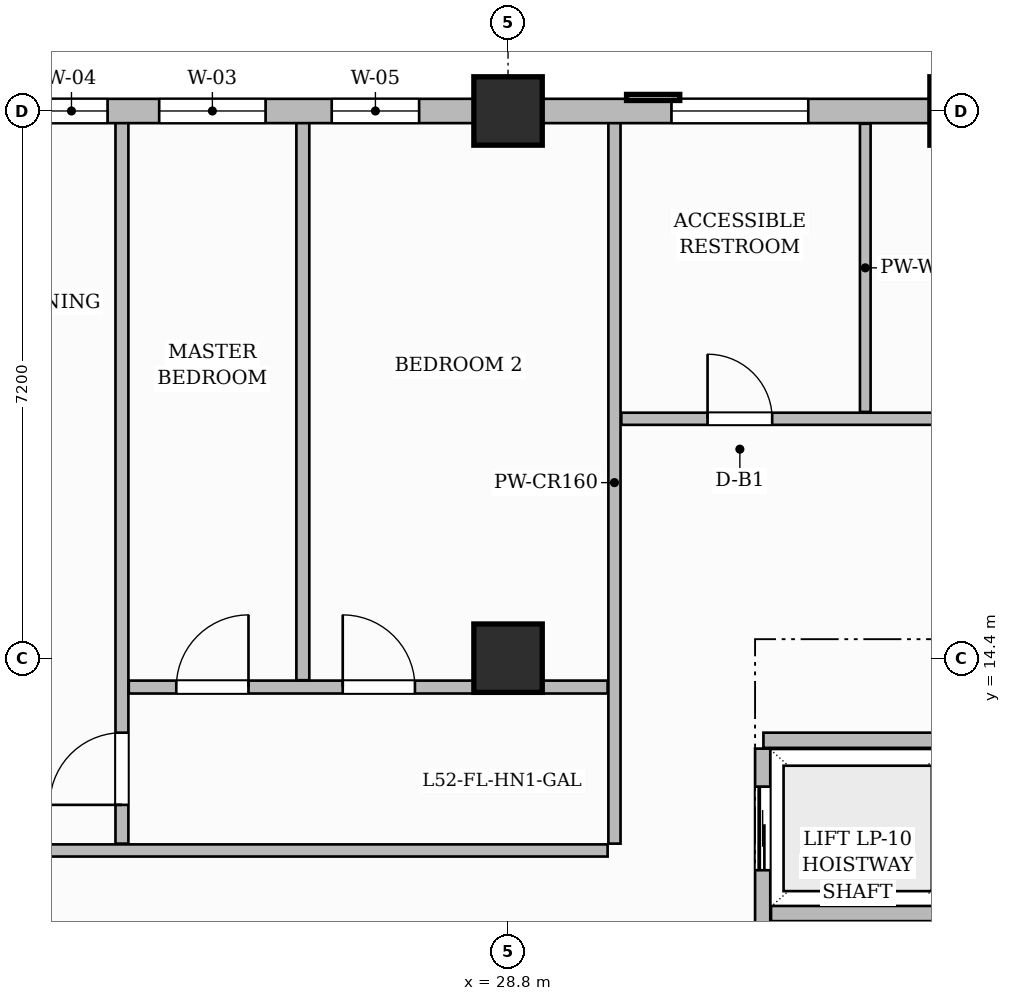
"""IFC4 building model, lengths in metres.
Left out: names, types, materials, properties, quantities, classifications, styles, units other than length and angle.
Written with IfcOpenShell. Run it as: python <this file> out.ifc"""

import sys

from ifc_helpers import new_model, si_unit, direction, frame, frame_2d, origin, origin_2d, place, context, subcontext, project, spatial, rectangle, extrude, source, transform, mapped, element, fill, save


model = new_model("IFC4")
c1 = context("Model", 3, precision=1e-05, world=origin(), true_north=direction((0.0, 1.0)))
c2 = subcontext(c1, "Body", "Model", "MODEL_VIEW")
j1 = project(units=[si_unit("LENGTHUNIT", "METRE"), si_unit("PLANEANGLEUNIT", "RADIAN")], contexts=[c1])
p1 = place(None, origin())
s1 = spatial("IfcSite", under=j1, at=p1, CompositionType="ELEMENT")
p2 = place(p1, origin())
s2 = spatial("IfcBuilding", under=s1, at=p2, CompositionType="ELEMENT")
p3 = place(p2, frame((0.0, 0.0, 209.6)))
s3 = spatial("IfcBuildingStorey", under=s2, at=p3, CompositionType="ELEMENT", Elevation=209.6)
m1 = source(origin(), c2, "Body", "SweptSolid", [
    extrude(rectangle(XDim=0.9, YDim=0.9, at=origin_2d()), origin(), (0.0, 0.0, 1.0), 3.85),
])
for number, where, z_axis, x_axis in (
    (1, (28.8, 14.4, 0.0), (0.0, 0.0, 1.0), (1.0, 0.0, 0.0)),
    (2, (28.8, 21.6, 0.0), (0.0, 0.0, 1.0), (1.0, 0.0, 0.0)),
    (3, (34.8, 21.6, 0.0), (0.0, 0.0, 1.0), (1.0, 0.0, 0.0)),
):
    element("IfcColumn", number, at=place(p3, frame(where, z_axis=z_axis, x_axis=x_axis)), inside=s3, PredefinedType="COLUMN", context=c2, shape_type="MappedRepresentation", body=[
        mapped(m1, transform((0.0, 0.0, 0.0), scale=1.0)),
    ])
p4 = place(p3, frame((32.16, 13.32, 0.0), z_axis=(0.0, 0.0, 1.0), x_axis=(1.0, 0.0, 0.0)))
e4 = element("IfcWall", 4, at=p4, inside=s3, PredefinedType="PARTITIONING", context=c2, shape_type="SweptSolid", body=[
    extrude(rectangle(XDim=2.36, YDim=0.2, at=frame_2d((1.18, 0.0))), origin(), (0.0, 0.0, 1.0), 3.6),
])
p5 = place(p3, frame((32.15, 4.39, 0.0), z_axis=(0.0, 0.0, 1.0), x_axis=(0.0, 1.0, 0.0)))
e5 = element("IfcWall", 5, at=p5, inside=s3, PredefinedType="PARTITIONING", context=c2, shape_type="SweptSolid", body=[
    extrude(rectangle(XDim=8.82, YDim=0.2, at=frame_2d((4.41, 0.0))), origin(), (0.0, 0.0, 1.0), 3.6),
])
p6 = place(p5, frame((0.5, 0.0, 0.0)))
e6 = element("IfcOpeningElement", 6, at=p6, cuts=e5, PredefinedType="OPENING", context=c2, shape_type="SweptSolid", body=[
    extrude(rectangle(XDim=1.1, YDim=2.2, at=frame_2d((0.55, 1.1))), frame((0.0, 0.11, 0.0), z_axis=(0.0, -1.0, 0.0), x_axis=(1.0, 0.0, 0.0)), (0.0, 0.0, 1.0), 0.22),
])
p7 = place(p5, frame((2.74, 0.0, 0.0)))
e7 = element("IfcOpeningElement", 7, at=p7, cuts=e5, PredefinedType="OPENING", context=c2, shape_type="SweptSolid", body=[
    extrude(rectangle(XDim=1.1, YDim=2.2, at=frame_2d((0.55, 1.1))), frame((0.0, 0.11, 0.0), z_axis=(0.0, -1.0, 0.0), x_axis=(1.0, 0.0, 0.0)), (0.0, 0.0, 1.0), 0.22),
])
p8 = place(p5, frame((4.98, 0.0, 0.0)))
e8 = element("IfcOpeningElement", 8, at=p8, cuts=e5, PredefinedType="OPENING", context=c2, shape_type="SweptSolid", body=[
    extrude(rectangle(XDim=1.1, YDim=2.2, at=frame_2d((0.55, 1.1))), frame((0.0, 0.11, 0.0), z_axis=(0.0, -1.0, 0.0), x_axis=(1.0, 0.0, 0.0)), (0.0, 0.0, 1.0), 0.22),
])
p9 = place(p5, frame((7.22, 0.0, 0.0)))
e9 = element("IfcOpeningElement", 9, at=p9, cuts=e5, PredefinedType="OPENING", context=c2, shape_type="SweptSolid", body=[
    extrude(rectangle(XDim=1.1, YDim=2.2, at=frame_2d((0.55, 1.1))), frame((0.0, 0.11, 0.0), z_axis=(0.0, -1.0, 0.0), x_axis=(1.0, 0.0, 0.0)), (0.0, 0.0, 1.0), 0.22),
])
p10 = place(p3, frame((32.26, 11.04, 0.0), z_axis=(0.0, 0.0, 1.0), x_axis=(1.0, 0.0, 0.0)))
e10 = element("IfcWall", 10, at=p10, inside=s3, PredefinedType="PARTITIONING", context=c2, shape_type="SweptSolid", body=[
    extrude(rectangle(XDim=2.23, YDim=0.2, at=frame_2d((1.115, 0.0))), origin(), (0.0, 0.0, 1.0), 3.6),
])
p11 = place(p3, frame((14.568, 11.87, 0.0), z_axis=(0.0, 0.0, 1.0), x_axis=(1.0, 0.0, 0.0)))
e11 = element("IfcWall", 11, at=p11, inside=s3, PredefinedType="PARTITIONING", context=c2, shape_type="SweptSolid", body=[
    extrude(rectangle(XDim=15.542, YDim=0.16, at=frame_2d((7.771, 0.0))), origin(), (0.0, 0.0, 1.0), 3.6),
])
p12 = place(p11, frame((6.557, 0.0, 0.0)))
e12 = element("IfcOpeningElement", 12, at=p12, cuts=e11, PredefinedType="OPENING", context=c2, shape_type="SweptSolid", body=[
    extrude(rectangle(XDim=1.05, YDim=2.25, at=frame_2d((0.525, 1.125))), frame((0.0, 0.09, 0.0), z_axis=(0.0, -1.0, 0.0), x_axis=(1.0, 0.0, 0.0)), (0.0, 0.0, 1.0), 0.18),
])
p13 = place(p3, frame((30.2, 11.96, 0.0), z_axis=(0.0, 0.0, 1.0), x_axis=(0.0, 1.0, 0.0)))
e13 = element("IfcWall", 13, at=p13, inside=s3, PredefinedType="PARTITIONING", context=c2, shape_type="SweptSolid", body=[
    extrude(rectangle(XDim=9.5, YDim=0.16, at=frame_2d((4.75, 0.0))), origin(), (0.0, 0.0, 1.0), 3.6),
])
p14 = place(p3, frame((30.29, 17.55, 0.0), z_axis=(0.0, 0.0, 1.0), x_axis=(1.0, 0.0, 0.0)))
e14 = element("IfcWall", 14, at=p14, inside=s3, PredefinedType="PARTITIONING", context=c2, shape_type="SweptSolid", body=[
    extrude(rectangle(XDim=19.37, YDim=0.16, at=frame_2d((9.685, 0.0))), origin(), (0.0, 0.0, 1.0), 3.6),
])
p15 = place(p14, frame((1.135, 0.0, 0.0)))
e15 = element("IfcOpeningElement", 15, at=p15, cuts=e14, PredefinedType="OPENING", context=c2, shape_type="SweptSolid", body=[
    extrude(rectangle(XDim=0.85, YDim=2.1, at=frame_2d((0.425, 1.05))), frame((0.0, 0.09, 0.0), z_axis=(0.0, -1.0, 0.0), x_axis=(1.0, 0.0, 0.0)), (0.0, 0.0, 1.0), 0.18),
])
p16 = place(p14, frame((5.71, 0.0, 0.0)))
e16 = element("IfcOpeningElement", 16, at=p16, cuts=e14, PredefinedType="OPENING", context=c2, shape_type="SweptSolid", body=[
    extrude(rectangle(XDim=0.9, YDim=2.15, at=frame_2d((0.45, 1.075))), frame((0.0, 0.09, 0.0), z_axis=(0.0, -1.0, 0.0), x_axis=(1.0, 0.0, 0.0)), (0.0, 0.0, 1.0), 0.18),
])
p17 = place(p14, frame((10.635, 0.0, 0.0)))
e17 = element("IfcOpeningElement", 17, at=p17, cuts=e14, PredefinedType="OPENING", context=c2, shape_type="SweptSolid", body=[
    extrude(rectangle(XDim=0.95, YDim=2.15, at=frame_2d((0.475, 1.075))), frame((0.0, 0.09, 0.0), z_axis=(0.0, -1.0, 0.0), x_axis=(1.0, 0.0, 0.0)), (0.0, 0.0, 1.0), 0.18),
])
p18 = place(p14, frame((16.235, 0.0, 0.0)))
e18 = element("IfcOpeningElement", 18, at=p18, cuts=e14, PredefinedType="OPENING", context=c2, shape_type="SweptSolid", body=[
    extrude(rectangle(XDim=0.95, YDim=2.15, at=frame_2d((0.475, 1.075))), frame((0.0, 0.09, 0.0), z_axis=(0.0, -1.0, 0.0), x_axis=(1.0, 0.0, 0.0)), (0.0, 0.0, 1.0), 0.18),
])
p19 = place(p3, frame((33.5, 17.64, 0.0), z_axis=(0.0, 0.0, 1.0), x_axis=(0.0, 1.0, 0.0)))
e19 = element("IfcWall", 19, at=p19, inside=s3, PredefinedType="PARTITIONING", context=c2, shape_type="SweptSolid", body=[
    extrude(rectangle(XDim=3.792, YDim=0.14, at=frame_2d((1.896, 0.0))), origin(), (0.0, 0.0, 1.0), 3.6),
])
p20 = place(p3, frame((23.72, 11.96, 0.0), z_axis=(0.0, 0.0, 1.0), x_axis=(0.0, 1.0, 0.0)))
e20 = element("IfcWall", 20, at=p20, inside=s3, PredefinedType="PARTITIONING", context=c2, shape_type="SweptSolid", body=[
    extrude(rectangle(XDim=9.5, YDim=0.17, at=frame_2d((4.75, 0.0))), origin(), (0.0, 0.0, 1.0), 3.6),
])
p21 = place(p20, frame((0.51, 0.0, 0.0)))
e21 = element("IfcOpeningElement", 21, at=p21, cuts=e20, PredefinedType="OPENING", context=c2, shape_type="SweptSolid", body=[
    extrude(rectangle(XDim=0.95, YDim=2.15, at=frame_2d((0.475, 1.075))), frame((0.0, 0.095, 0.0), z_axis=(0.0, -1.0, 0.0), x_axis=(1.0, 0.0, 0.0)), (0.0, 0.0, 1.0), 0.19),
])
p22 = place(p3, frame((23.81, 14.02, 0.0), z_axis=(0.0, 0.0, 1.0), x_axis=(1.0, 0.0, 0.0)))
e22 = element("IfcWall", 22, at=p22, inside=s3, PredefinedType="PARTITIONING", context=c2, shape_type="SweptSolid", body=[
    extrude(rectangle(XDim=6.3, YDim=0.17, at=frame_2d((3.15, 0.0))), origin(), (0.0, 0.0, 1.0), 3.6),
])
p23 = place(p22, frame((0.625, 0.0, 0.0)))
e23 = element("IfcOpeningElement", 23, at=p23, cuts=e22, PredefinedType="OPENING", context=c2, shape_type="SweptSolid", body=[
    extrude(rectangle(XDim=0.95, YDim=2.15, at=frame_2d((0.475, 1.075))), frame((0.0, 0.095, 0.0), z_axis=(0.0, -1.0, 0.0), x_axis=(1.0, 0.0, 0.0)), (0.0, 0.0, 1.0), 0.19),
])
p24 = place(p22, frame((2.815, 0.0, 0.0)))
e24 = element("IfcOpeningElement", 24, at=p24, cuts=e22, PredefinedType="OPENING", context=c2, shape_type="SweptSolid", body=[
    extrude(rectangle(XDim=0.95, YDim=2.15, at=frame_2d((0.475, 1.075))), frame((0.0, 0.095, 0.0), z_axis=(0.0, -1.0, 0.0), x_axis=(1.0, 0.0, 0.0)), (0.0, 0.0, 1.0), 0.19),
])
p25 = place(p3, frame((26.1, 14.11, 0.0), z_axis=(0.0, 0.0, 1.0), x_axis=(0.0, 1.0, 0.0)))
e25 = element("IfcWall", 25, at=p25, inside=s3, PredefinedType="PARTITIONING", context=c2, shape_type="SweptSolid", body=[
    extrude(rectangle(XDim=7.35, YDim=0.17, at=frame_2d((3.675, 0.0))), origin(), (0.0, 0.0, 1.0), 3.6),
])
p26 = place(p3, frame((18.0, 21.6, 0.0), z_axis=(0.0, 0.0, 1.0), x_axis=(1.0, 0.0, 0.0)))
e26 = element("IfcWall", 26, at=p26, inside=s3, PredefinedType="SOLIDWALL", context=c2, shape_type="SweptSolid", body=[
    extrude(rectangle(XDim=31.8, YDim=0.32, at=frame_2d((15.9, 0.0))), origin(), (0.0, 0.0, 1.0), 3.085),
])
p27 = place(p26, frame((0.885, 0.0, 0.8)))
e27 = element("IfcOpeningElement", 27, at=p27, cuts=e26, PredefinedType="OPENING", context=c2, shape_type="SweptSolid", body=[
    extrude(rectangle(XDim=1.4, YDim=1.85, at=frame_2d((0.7, 0.925))), frame((0.0, 0.17, 0.0), z_axis=(0.0, -1.0, 0.0), x_axis=(1.0, 0.0, 0.0)), (0.0, 0.0, 1.0), 0.34),
])
p28 = place(p26, frame((4.581, 0.0, 0.8)))
e28 = element("IfcOpeningElement", 28, at=p28, cuts=e26, PredefinedType="OPENING", context=c2, shape_type="SweptSolid", body=[
    extrude(rectangle(XDim=0.95, YDim=1.75, at=frame_2d((0.475, 0.875))), frame((0.0, 0.17, 0.0), z_axis=(0.0, -1.0, 0.0), x_axis=(1.0, 0.0, 0.0)), (0.0, 0.0, 1.0), 0.34),
])
p29 = place(p26, frame((6.21, 0.0, 0.8)))
e29 = element("IfcOpeningElement", 29, at=p29, cuts=e26, PredefinedType="OPENING", context=c2, shape_type="SweptSolid", body=[
    extrude(rectangle(XDim=1.4, YDim=1.85, at=frame_2d((0.7, 0.925))), frame((0.0, 0.17, 0.0), z_axis=(0.0, -1.0, 0.0), x_axis=(1.0, 0.0, 0.0)), (0.0, 0.0, 1.0), 0.34),
])
p30 = place(p26, frame((8.48, 0.0, 0.8)))
e30 = element("IfcOpeningElement", 30, at=p30, cuts=e26, PredefinedType="OPENING", context=c2, shape_type="SweptSolid", body=[
    extrude(rectangle(XDim=1.15, YDim=1.8, at=frame_2d((0.575, 0.9))), frame((0.0, 0.17, 0.0), z_axis=(0.0, -1.0, 0.0), x_axis=(1.0, 0.0, 0.0)), (0.0, 0.0, 1.0), 0.34),
])
p31 = place(p26, frame((12.95, 0.0, 0.8)))
e31 = element("IfcOpeningElement", 31, at=p31, cuts=e26, PredefinedType="OPENING", context=c2, shape_type="SweptSolid", body=[
    extrude(rectangle(XDim=1.8, YDim=1.85, at=frame_2d((0.9, 0.925))), frame((0.0, 0.17, 0.0), z_axis=(0.0, -1.0, 0.0), x_axis=(1.0, 0.0, 0.0)), (0.0, 0.0, 1.0), 0.34),
])
p32 = place(p26, frame((18.596, 0.0, 0.8)))
e32 = element("IfcOpeningElement", 32, at=p32, cuts=e26, PredefinedType="OPENING", context=c2, shape_type="SweptSolid", body=[
    extrude(rectangle(XDim=1.8, YDim=1.85, at=frame_2d((0.9, 0.925))), frame((0.0, 0.17, 0.0), z_axis=(0.0, -1.0, 0.0), x_axis=(1.0, 0.0, 0.0)), (0.0, 0.0, 1.0), 0.34),
])
p33 = place(p26, frame((21.729, 0.0, 0.8)))
e33 = element("IfcOpeningElement", 33, at=p33, cuts=e26, PredefinedType="OPENING", context=c2, shape_type="SweptSolid", body=[
    extrude(rectangle(XDim=1.15, YDim=1.8, at=frame_2d((0.575, 0.9))), frame((0.0, 0.17, 0.0), z_axis=(0.0, -1.0, 0.0), x_axis=(1.0, 0.0, 0.0)), (0.0, 0.0, 1.0), 0.34),
])
p34 = place(p26, frame((25.121, 0.0, 0.8)))
e34 = element("IfcOpeningElement", 34, at=p34, cuts=e26, PredefinedType="OPENING", context=c2, shape_type="SweptSolid", body=[
    extrude(rectangle(XDim=0.95, YDim=1.75, at=frame_2d((0.475, 0.875))), frame((0.0, 0.17, 0.0), z_axis=(0.0, -1.0, 0.0), x_axis=(1.0, 0.0, 0.0)), (0.0, 0.0, 1.0), 0.34),
])
p35 = place(p26, frame((27.804, 0.0, 0.8)))
e35 = element("IfcOpeningElement", 35, at=p35, cuts=e26, PredefinedType="OPENING", context=c2, shape_type="SweptSolid", body=[
    extrude(rectangle(XDim=1.8, YDim=1.85, at=frame_2d((0.9, 0.925))), frame((0.0, 0.17, 0.0), z_axis=(0.0, -1.0, 0.0), x_axis=(1.0, 0.0, 0.0)), (0.0, 0.0, 1.0), 0.34),
])
m2 = source(origin(), c2, "Body", "SweptSolid", [
    extrude(rectangle(XDim=0.85, YDim=2.1, at=frame_2d((0.425, 1.05))), frame((0.0, 0.025, 0.0), z_axis=(0.0, -1.0, 0.0), x_axis=(1.0, 0.0, 0.0)), (0.0, 0.0, 1.0), 0.05),
])
p36 = place(p15, origin())
e36 = element("IfcDoor", 36, at=p36, inside=s3, OperationType="SINGLE_SWING_LEFT", PredefinedType="DOOR", context=c2, shape_type="MappedRepresentation", body=[
    mapped(m2, transform((0.0, 0.0, 0.0), scale=1.0)),
])
fill(e15, e36)
m3 = source(origin(), c2, "Body", "SweptSolid", [
    extrude(rectangle(XDim=0.95, YDim=2.15, at=frame_2d((0.475, 1.075))), frame((0.0, 0.025, 0.0), z_axis=(0.0, -1.0, 0.0), x_axis=(1.0, 0.0, 0.0)), (0.0, 0.0, 1.0), 0.05),
])
p37 = place(p21, origin())
e37 = element("IfcDoor", 37, at=p37, inside=s3, OperationType="SINGLE_SWING_LEFT", PredefinedType="DOOR", context=c2, shape_type="MappedRepresentation", body=[
    mapped(m3, transform((0.0, 0.0, 0.0), scale=1.0)),
])
fill(e21, e37)
p38 = place(p23, origin())
e38 = element("IfcDoor", 38, at=p38, inside=s3, OperationType="SINGLE_SWING_RIGHT", PredefinedType="DOOR", context=c2, shape_type="MappedRepresentation", body=[
    mapped(m3, transform((0.0, 0.0, 0.0), scale=1.0)),
])
fill(e23, e38)
p39 = place(p24, origin())
e39 = element("IfcDoor", 39, at=p39, inside=s3, OperationType="SINGLE_SWING_LEFT", PredefinedType="DOOR", context=c2, shape_type="MappedRepresentation", body=[
    mapped(m3, transform((0.0, 0.0, 0.0), scale=1.0)),
])
fill(e24, e39)
m4 = source(origin(), c2, "Body", "SweptSolid", [
    extrude(rectangle(XDim=1.1, YDim=2.2, at=frame_2d((0.55, 1.1))), frame((0.0, 0.025, 0.0), z_axis=(0.0, -1.0, 0.0), x_axis=(1.0, 0.0, 0.0)), (0.0, 0.0, 1.0), 0.05),
])
p40 = place(p9, origin())
e40 = element("IfcDoor", 40, at=p40, inside=s3, OperationType="SLIDING_TO_LEFT", PredefinedType="DOOR", context=c2, shape_type="MappedRepresentation", body=[
    mapped(m4, transform((0.0, 0.0, 0.0), scale=1.0)),
])
fill(e9, e40)
m5 = source(origin(), c2, "Body", "SweptSolid", [
    extrude(rectangle(XDim=0.95, YDim=1.75, at=frame_2d((0.475, 0.875))), frame((0.0, 0.03, 0.0), z_axis=(0.0, -1.0, 0.0), x_axis=(1.0, 0.0, 0.0)), (0.0, 0.0, 1.0), 0.06),
])
p41 = place(p28, origin())
e41 = element("IfcWindow", 41, at=p41, inside=s3, PartitioningType="SINGLE_PANEL", PredefinedType="WINDOW", context=c2, shape_type="MappedRepresentation", body=[
    mapped(m5, transform((0.0, 0.0, 0.0), scale=1.0)),
])
fill(e28, e41)
m6 = source(origin(), c2, "Body", "SweptSolid", [
    extrude(rectangle(XDim=1.4, YDim=1.85, at=frame_2d((0.7, 0.925))), frame((0.0, 0.03, 0.0), z_axis=(0.0, -1.0, 0.0), x_axis=(1.0, 0.0, 0.0)), (0.0, 0.0, 1.0), 0.06),
])
p42 = place(p29, origin())
e42 = element("IfcWindow", 42, at=p42, inside=s3, PartitioningType="SINGLE_PANEL", PredefinedType="WINDOW", context=c2, shape_type="MappedRepresentation", body=[
    mapped(m6, transform((0.0, 0.0, 0.0), scale=1.0)),
])
fill(e29, e42)
m7 = source(origin(), c2, "Body", "SweptSolid", [
    extrude(rectangle(XDim=1.15, YDim=1.8, at=frame_2d((0.575, 0.9))), frame((0.0, 0.03, 0.0), z_axis=(0.0, -1.0, 0.0), x_axis=(1.0, 0.0, 0.0)), (0.0, 0.0, 1.0), 0.06),
])
p43 = place(p30, origin())
e43 = element("IfcWindow", 43, at=p43, inside=s3, PartitioningType="SINGLE_PANEL", PredefinedType="WINDOW", context=c2, shape_type="MappedRepresentation", body=[
    mapped(m7, transform((0.0, 0.0, 0.0), scale=1.0)),
])
fill(e30, e43)
m8 = source(origin(), c2, "Body", "SweptSolid", [
    extrude(rectangle(XDim=1.8, YDim=1.85, at=frame_2d((0.9, 0.925))), frame((0.0, 0.03, 0.0), z_axis=(0.0, -1.0, 0.0), x_axis=(1.0, 0.0, 0.0)), (0.0, 0.0, 1.0), 0.06),
])
p44 = place(p31, origin())
e44 = element("IfcWindow", 44, at=p44, inside=s3, PartitioningType="DOUBLE_PANEL_VERTICAL", PredefinedType="WINDOW", context=c2, shape_type="MappedRepresentation", body=[
    mapped(m8, transform((0.0, 0.0, 0.0), scale=1.0)),
])
fill(e31, e44)
save(model, sys.argv[1])
